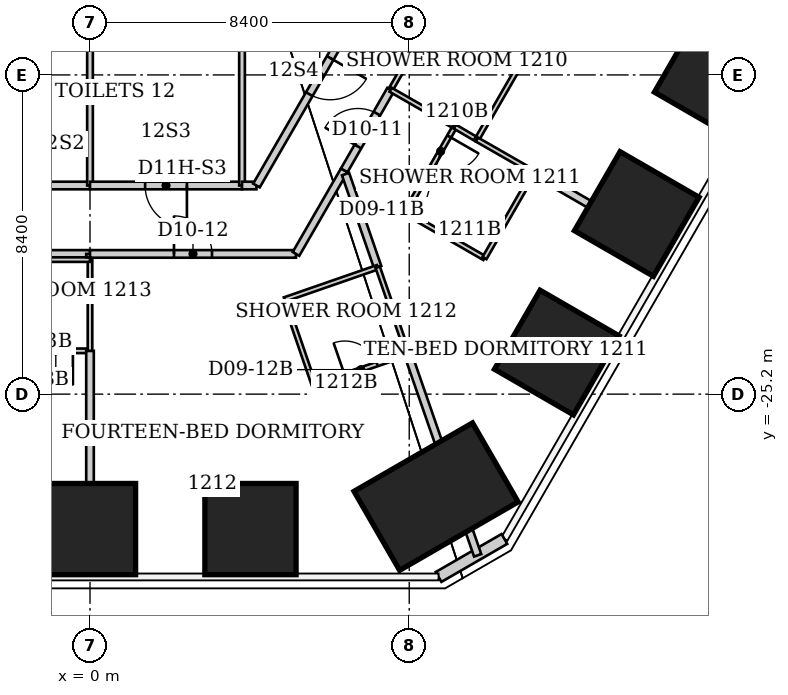
"""IFC4 building model, lengths in metres.
Left out: names, types, materials, properties, quantities, classifications, styles, units other than length and angle.
Written with IfcOpenShell. Run it as: python <this file> out.ifc"""

import sys

from ifc_helpers import new_model, si_unit, direction, frame, frame_2d, origin, origin_2d, place, context, subcontext, project, spatial, rectangle, extrude, clip, halfspace, element, fill, save


model = new_model("IFC4")
c1 = context("Model", 3, precision=1e-05, world=origin(), true_north=direction((0.0, 1.0)))
c2 = subcontext(c1, "Body", "Model", "MODEL_VIEW")
j1 = project(units=[si_unit("LENGTHUNIT", "METRE"), si_unit("PLANEANGLEUNIT", "RADIAN")], contexts=[c1])
p1 = place(None, origin())
s1 = spatial("IfcSite", under=j1, at=p1, CompositionType="ELEMENT")
p2 = place(p1, origin())
s2 = spatial("IfcBuilding", under=s1, at=p2, CompositionType="ELEMENT")
p3 = place(p2, frame((0.0, 0.0, 53.4)))
s3 = spatial("IfcBuildingStorey", under=s2, at=p3, CompositionType="ELEMENT", Elevation=53.4)
p4 = place(p3, frame((16.491, -16.813, 0.0), z_axis=(0.0, 0.0, 1.0), x_axis=(0.866025403784, -0.5, 0.0)))
e1 = element("IfcColumn", 1, at=p4, inside=s3, PredefinedType="COLUMN", context=c2, shape_type="SweptSolid", body=[
    clip(extrude(rectangle(XDim=2.4, YDim=2.4, at=origin_2d()), origin(), (0.0, 0.0, 1.0), 3.744), halfspace(frame((0.0, 0.0, 3.64)), False)),
])
p5 = place(p3, frame((14.387, -20.459, 0.0), z_axis=(0.0, 0.0, 1.0), x_axis=(0.866025403784, -0.5, 0.0)))
e2 = element("IfcColumn", 2, at=p5, inside=s3, PredefinedType="COLUMN", context=c2, shape_type="SweptSolid", body=[
    clip(extrude(rectangle(XDim=2.4, YDim=2.4, at=origin_2d()), origin(), (0.0, 0.0, 1.0), 3.736), halfspace(frame((0.0, 0.0, 3.64)), False)),
])
p6 = place(p3, frame((12.282, -24.105, 0.0), z_axis=(0.0, 0.0, 1.0), x_axis=(0.866025403784, -0.5, 0.0)))
e3 = element("IfcColumn", 3, at=p6, inside=s3, PredefinedType="COLUMN", context=c2, shape_type="SweptSolid", body=[
    clip(extrude(rectangle(XDim=2.4, YDim=2.4, at=origin_2d()), origin(), (0.0, 0.0, 1.0), 3.728), halfspace(frame((0.0, 0.0, 3.64)), False)),
])
p7 = place(p3, frame((9.106, -27.897, 0.0), z_axis=(0.0, 0.0, 1.0), x_axis=(0.5, -0.866025403784, 0.0)))
e4 = element("IfcColumn", 4, at=p7, inside=s3, PredefinedType="COLUMN", context=c2, shape_type="SweptSolid", body=[
    clip(extrude(rectangle(XDim=2.4, YDim=3.6, at=origin_2d()), origin(), (0.0, 0.0, 1.0), 3.726), halfspace(frame((0.0, 0.0, 3.64)), False)),
])
p8 = place(p3, frame((4.222, -28.751, 0.0), z_axis=(0.0, 0.0, 1.0), x_axis=(0.0, -1.0, 0.0)))
e5 = element("IfcColumn", 5, at=p8, inside=s3, PredefinedType="COLUMN", context=c2, shape_type="SweptSolid", body=[
    clip(extrude(rectangle(XDim=2.4, YDim=2.4, at=origin_2d()), origin(), (0.0, 0.0, 1.0), 3.737), halfspace(frame((0.0, 0.0, 3.64)), False)),
])
p9 = place(p3, frame((0.0, -28.751, 0.0), z_axis=(0.0, 0.0, 1.0), x_axis=(0.0, -1.0, 0.0)))
e6 = element("IfcColumn", 6, at=p9, inside=s3, PredefinedType="COLUMN", context=c2, shape_type="SweptSolid", body=[
    clip(extrude(rectangle(XDim=2.4, YDim=2.4, at=origin_2d()), origin(), (0.0, 0.0, 1.0), 3.745), halfspace(frame((0.0, 0.0, 3.64)), False)),
])
p10 = place(p3, frame((10.904, -29.011, 0.0), z_axis=(0.0, 0.0, 1.0), x_axis=(-0.866010750942, -0.50002537861, 0.0)))
e7 = element("IfcWall", 7, at=p10, inside=s3, PredefinedType="SOLIDWALL", context=c2, shape_type="SweptSolid", body=[
    extrude(rectangle(XDim=2.0, YDim=0.3, at=frame_2d((1.0, 0.0))), origin(), (0.0, 0.0, 1.0), 3.64),
])
p11 = place(p3, frame((-5.42, -21.51, 0.0), z_axis=(0.0, 0.0, 1.0), x_axis=(1.0, 0.0, 0.0)))
e8 = element("IfcWall", 8, at=p11, inside=s3, PredefinedType="PARTITIONING", context=c2, shape_type="SweptSolid", body=[
    extrude(rectangle(XDim=5.42, YDim=0.2, at=frame_2d((2.71, 0.0))), origin(), (0.0, 0.0, 1.0), 3.64),
])
p12 = place(p11, frame((1.71, 0.0, 0.0)))
e9 = element("IfcOpeningElement", 9, at=p12, cuts=e8, PredefinedType="OPENING", context=c2, shape_type="SweptSolid", body=[
    extrude(rectangle(XDim=1.0, YDim=2.13, at=frame_2d((0.5, 1.065))), frame((0.0, 0.1, 0.0), z_axis=(0.0, -1.0, 0.0), x_axis=(1.0, 0.0, 0.0)), (0.0, 0.0, 1.0), 0.2),
])
p13 = place(p3, frame((-2.6, -24.06, 0.0), z_axis=(0.0, 0.0, 1.0), x_axis=(1.0, 0.0, 0.0)))
e10 = element("IfcWall", 10, at=p13, inside=s3, PredefinedType="PARTITIONING", context=c2, shape_type="SweptSolid", body=[
    extrude(rectangle(XDim=2.6, YDim=0.12, at=frame_2d((1.3, 0.0))), origin(), (0.0, 0.0, 1.0), 3.64),
])
p14 = place(p13, frame((1.25, 0.0, 0.0)))
e11 = element("IfcOpeningElement", 11, at=p14, cuts=e10, PredefinedType="OPENING", context=c2, shape_type="SweptSolid", body=[
    extrude(rectangle(XDim=0.9, YDim=2.03, at=frame_2d((0.45, 1.015))), frame((0.0, 0.06, 0.0), z_axis=(0.0, -1.0, 0.0), x_axis=(1.0, 0.0, 0.0)), (0.0, 0.0, 1.0), 0.12),
])
p15 = place(p3, frame((0.0, -29.89, 0.0), z_axis=(0.0, 0.0, 1.0), x_axis=(0.0, 1.0, 0.0)))
e12 = element("IfcWall", 12, at=p15, inside=s3, PredefinedType="PARTITIONING", context=c2, shape_type="SweptSolid", body=[
    extrude(rectangle(XDim=5.83, YDim=0.2, at=frame_2d((2.915, 0.0))), origin(), (0.0, 0.0, 1.0), 2.86),
])
p16 = place(p3, frame((0.0, -24.06, 0.0), z_axis=(0.0, 0.0, 1.0), x_axis=(0.0, 1.0, 0.0)))
e13 = element("IfcWall", 13, at=p16, inside=s3, PredefinedType="PARTITIONING", context=c2, shape_type="SweptSolid", body=[
    extrude(rectangle(XDim=2.4, YDim=0.12, at=frame_2d((1.2, 0.0))), origin(), (0.0, 0.0, 1.0), 2.86),
])
p17 = place(p3, frame((0.0, -21.66, 0.0), z_axis=(0.0, 0.0, 1.0), x_axis=(-1.0, 0.0, 0.0)))
e14 = element("IfcWall", 14, at=p17, inside=s3, PredefinedType="PARTITIONING", context=c2, shape_type="SweptSolid", body=[
    extrude(rectangle(XDim=2.6, YDim=0.12, at=frame_2d((1.3, 0.0))), origin(), (0.0, 0.0, 1.0), 3.64),
])
p18 = place(p3, frame((0.0, -21.6, 0.0), z_axis=(0.0, 0.0, 1.0), x_axis=(0.0, 1.0, 0.0)))
e15 = element("IfcWall", 15, at=p18, inside=s3, PredefinedType="PARTITIONING", context=c2, shape_type="SweptSolid", body=[
    extrude(rectangle(XDim=0.09, YDim=0.2, at=frame_2d((0.045, 0.0))), origin(), (0.0, 0.0, 1.0), 3.64),
])
p19 = place(p3, frame((0.0, -21.51, 0.0), z_axis=(0.0, 0.0, 1.0), x_axis=(1.0, 0.0, 0.0)))
e16 = element("IfcWall", 16, at=p19, inside=s3, PredefinedType="PARTITIONING", context=c2, shape_type="SweptSolid", body=[
    extrude(rectangle(XDim=5.42, YDim=0.2, at=frame_2d((2.71, 0.0))), origin(), (0.0, 0.0, 1.0), 3.64),
])
p20 = place(p19, frame((2.21, 0.0, 0.0)))
e17 = element("IfcOpeningElement", 17, at=p20, cuts=e16, PredefinedType="OPENING", context=c2, shape_type="SweptSolid", body=[
    extrude(rectangle(XDim=1.0, YDim=2.13, at=frame_2d((0.5, 1.065))), frame((0.0, 0.1, 0.0), z_axis=(0.0, -1.0, 0.0), x_axis=(1.0, 0.0, 0.0)), (0.0, 0.0, 1.0), 0.2),
])
p21 = place(p3, frame((0.0, -19.71, 0.0), z_axis=(0.0, 0.0, 1.0), x_axis=(-1.0, 0.0, 0.0)))
e18 = element("IfcWall", 18, at=p21, inside=s3, PredefinedType="PARTITIONING", context=c2, shape_type="SweptSolid", body=[
    extrude(rectangle(XDim=4.0, YDim=0.2, at=frame_2d((2.0, 0.0))), origin(), (0.0, 0.0, 1.0), 3.64),
])
p22 = place(p3, frame((0.0, -13.95, 0.0), z_axis=(0.0, 0.0, 1.0), x_axis=(0.0, -1.0, 0.0)))
e19 = element("IfcWall", 19, at=p22, inside=s3, PredefinedType="PARTITIONING", context=c2, shape_type="SweptSolid", body=[
    extrude(rectangle(XDim=5.76, YDim=0.15, at=frame_2d((2.88, 0.0))), origin(), (0.0, 0.0, 1.0), 2.86),
])
p23 = place(p3, frame((4.0, -19.71, 0.0), z_axis=(0.0, 0.0, 1.0), x_axis=(-1.0, 0.0, 0.0)))
e20 = element("IfcWall", 20, at=p23, inside=s3, PredefinedType="PARTITIONING", context=c2, shape_type="SweptSolid", body=[
    extrude(rectangle(XDim=4.0, YDim=0.2, at=frame_2d((2.0, 0.0))), origin(), (0.0, 0.0, 1.0), 3.64),
])
p24 = place(p23, frame((1.45, 0.0, 0.0)))
e21 = element("IfcOpeningElement", 21, at=p24, cuts=e20, PredefinedType="OPENING", context=c2, shape_type="SweptSolid", body=[
    extrude(rectangle(XDim=1.1, YDim=2.2, at=frame_2d((0.55, 1.1))), frame((0.0, 0.1, 0.0), z_axis=(0.0, -1.0, 0.0), x_axis=(1.0, 0.0, 0.0)), (0.0, 0.0, 1.0), 0.2),
])
p25 = place(p3, frame((4.0, -13.95, 0.0), z_axis=(0.0, 0.0, 1.0), x_axis=(0.0, -1.0, 0.0)))
e22 = element("IfcWall", 22, at=p25, inside=s3, PredefinedType="PARTITIONING", context=c2, shape_type="SweptSolid", body=[
    extrude(rectangle(XDim=5.76, YDim=0.15, at=frame_2d((2.88, 0.0))), origin(), (0.0, 0.0, 1.0), 3.64),
])
p26 = place(p3, frame((4.38, -19.71, 0.0), z_axis=(0.0, 0.0, 1.0), x_axis=(-1.0, 0.0, 0.0)))
e23 = element("IfcWall", 23, at=p26, inside=s3, PredefinedType="PARTITIONING", context=c2, shape_type="SweptSolid", body=[
    extrude(rectangle(XDim=0.38, YDim=0.2, at=frame_2d((0.19, 0.0))), origin(), (0.0, 0.0, 1.0), 3.64),
])
p27 = place(p3, frame((5.12, -22.71, 0.0), z_axis=(0.0, 0.0, 1.0), x_axis=(0.324880771143, -0.945754981241, 0.0)))
e24 = element("IfcWall", 24, at=p27, inside=s3, PredefinedType="PARTITIONING", context=c2, shape_type="SweptSolid", body=[
    extrude(rectangle(XDim=2.4, YDim=0.12, at=frame_2d((1.2, 0.0))), origin(), (0.0, 0.0, 1.0), 3.64),
])
p28 = place(p3, frame((5.42, -21.51, 0.0), z_axis=(0.0, 0.0, 1.0), x_axis=(0.499963722229, 0.866046347752, 0.0)))
e25 = element("IfcWall", 25, at=p28, inside=s3, PredefinedType="PARTITIONING", context=c2, shape_type="SweptSolid", body=[
    extrude(rectangle(XDim=2.54, YDim=0.2, at=frame_2d((1.27, 0.0))), origin(), (0.0, 0.0, 1.0), 3.64),
])
p29 = place(p3, frame((5.9, -24.98, 0.0), z_axis=(0.0, 0.0, 1.0), x_axis=(0.945165466094, 0.326591857987, 0.0)))
e26 = element("IfcWall", 26, at=p29, inside=s3, PredefinedType="PARTITIONING", context=c2, shape_type="SweptSolid", body=[
    extrude(rectangle(XDim=2.603, YDim=0.12, at=frame_2d((1.302, 0.0))), origin(), (0.0, 0.0, 1.0), 3.64),
])
p30 = place(p29, frame((0.85, 0.0, 0.0)))
e27 = element("IfcOpeningElement", 27, at=p30, cuts=e26, PredefinedType="OPENING", context=c2, shape_type="SweptSolid", body=[
    extrude(rectangle(XDim=0.9, YDim=2.03, at=frame_2d((0.45, 1.015))), frame((0.0, 0.06, 0.0), z_axis=(0.0, -1.0, 0.0), x_axis=(1.0, 0.0, 0.0)), (0.0, 0.0, 1.0), 0.12),
])
p31 = place(p3, frame((6.69, -19.31, 0.0), z_axis=(0.0, 0.0, 1.0), x_axis=(0.498748634132, 0.866746675766, 0.0)))
e28 = element("IfcWall", 28, at=p31, inside=s3, PredefinedType="PARTITIONING", context=c2, shape_type="SweptSolid", body=[
    extrude(rectangle(XDim=2.446, YDim=0.2, at=frame_2d((1.223, 0.0))), origin(), (0.0, 0.0, 1.0), 3.64),
])
p32 = place(p31, frame((0.723, 0.0, 0.0)))
e29 = element("IfcOpeningElement", 29, at=p32, cuts=e28, PredefinedType="OPENING", context=c2, shape_type="SweptSolid", body=[
    extrude(rectangle(XDim=1.0, YDim=2.13, at=frame_2d((0.5, 1.065))), frame((0.0, 0.1, 0.0), z_axis=(0.0, -1.0, 0.0), x_axis=(1.0, 0.0, 0.0)), (0.0, 0.0, 1.0), 0.2),
])
p33 = place(p3, frame((6.724, -19.409, 0.0), z_axis=(0.0, 0.0, 1.0), x_axis=(0.326182205696, -0.945306917719, 0.0)))
e30 = element("IfcWall", 30, at=p33, inside=s3, PredefinedType="PARTITIONING", context=c2, shape_type="SweptSolid", body=[
    extrude(rectangle(XDim=2.593, YDim=0.2, at=frame_2d((1.296, 0.0))), origin(), (0.0, 0.0, 1.0), 3.64),
])
p34 = place(p3, frame((7.57, -21.86, 0.0), z_axis=(0.0, 0.0, 1.0), x_axis=(-0.944782191137, -0.327698964463, 0.0)))
e31 = element("IfcWall", 31, at=p34, inside=s3, PredefinedType="PARTITIONING", context=c2, shape_type="SweptSolid", body=[
    extrude(rectangle(XDim=2.594, YDim=0.12, at=frame_2d((1.297, 0.0))), origin(), (0.0, 0.0, 1.0), 3.64),
])
p35 = place(p3, frame((7.57, -21.86, 0.0), z_axis=(0.0, 0.0, 1.0), x_axis=(0.327706459026, -0.944779591605, 0.0)))
e32 = element("IfcWall", 32, at=p35, inside=s3, PredefinedType="PARTITIONING", context=c2, shape_type="SweptSolid", body=[
    extrude(rectangle(XDim=2.35, YDim=0.12, at=frame_2d((1.175, 0.0))), origin(), (0.0, 0.0, 1.0), 3.64),
])
p36 = place(p3, frame((7.71, -13.95, 0.0), z_axis=(0.0, 0.0, 1.0), x_axis=(-0.500511113963, -0.865730110831, 0.0)))
e33 = element("IfcWall", 33, at=p36, inside=s3, PredefinedType="PARTITIONING", context=c2, shape_type="SweptSolid", body=[
    extrude(rectangle(XDim=6.653, YDim=0.2, at=frame_2d((3.327, 0.0))), origin(), (0.0, 0.0, 1.0), 3.64),
])
p37 = place(p36, frame((2.777, 0.0, 0.0)))
e34 = element("IfcOpeningElement", 34, at=p37, cuts=e33, PredefinedType="OPENING", context=c2, shape_type="SweptSolid", body=[
    extrude(rectangle(XDim=1.1, YDim=2.2, at=frame_2d((0.55, 1.1))), frame((0.0, 0.1, 0.0), z_axis=(0.0, -1.0, 0.0), x_axis=(1.0, 0.0, 0.0)), (0.0, 0.0, 1.0), 0.2),
])
p38 = place(p3, frame((7.91, -17.19, 0.0), z_axis=(0.0, 0.0, 1.0), x_axis=(0.499737123639, 0.866177122335, 0.0)))
e35 = element("IfcWall", 35, at=p38, inside=s3, PredefinedType="PARTITIONING", context=c2, shape_type="SweptSolid", body=[
    extrude(rectangle(XDim=2.401, YDim=0.12, at=frame_2d((1.201, 0.0))), origin(), (0.0, 0.0, 1.0), 3.64),
])
p39 = place(p3, frame((7.91, -17.19, 0.0), z_axis=(0.0, 0.0, 1.0), x_axis=(0.8673242112, -0.497743621421, 0.0)))
e36 = element("IfcWall", 36, at=p39, inside=s3, PredefinedType="PARTITIONING", context=c2, shape_type="SweptSolid", body=[
    extrude(rectangle(XDim=1.949, YDim=0.12, at=frame_2d((0.974, 0.0))), origin(), (0.0, 0.0, 1.0), 3.64),
])
p40 = place(p3, frame((8.3, -20.42, 0.0), z_axis=(0.0, 0.0, 1.0), x_axis=(0.866177122335, -0.499737123639, 0.0)))
e37 = element("IfcWall", 37, at=p40, inside=s3, PredefinedType="PARTITIONING", context=c2, shape_type="SweptSolid", body=[
    extrude(rectangle(XDim=2.401, YDim=0.12, at=frame_2d((1.201, 0.0))), origin(), (0.0, 0.0, 1.0), 3.64),
])
p41 = place(p3, frame((8.36, -24.13, 0.0), z_axis=(0.0, 0.0, 1.0), x_axis=(0.327332811485, -0.944909112309, 0.0)))
e38 = element("IfcWall", 38, at=p41, inside=s3, PredefinedType="PARTITIONING", context=c2, shape_type="SweptSolid", body=[
    extrude(rectangle(XDim=5.621, YDim=0.2, at=frame_2d((2.811, 0.0))), origin(), (0.0, 0.0, 1.0), 3.64),
])
p42 = place(p3, frame((9.6, -18.16, 0.0), z_axis=(0.0, 0.0, 1.0), x_axis=(-0.498627694264, -0.866816256489, 0.0)))
e39 = element("IfcWall", 39, at=p42, inside=s3, PredefinedType="PARTITIONING", context=c2, shape_type="SweptSolid", body=[
    extrude(rectangle(XDim=2.607, YDim=0.12, at=frame_2d((1.304, 0.0))), origin(), (0.0, 0.0, 1.0), 3.64),
])
p43 = place(p42, frame((0.3, 0.0, 0.0)))
e40 = element("IfcOpeningElement", 40, at=p43, cuts=e39, PredefinedType="OPENING", context=c2, shape_type="SweptSolid", body=[
    extrude(rectangle(XDim=0.9, YDim=2.03, at=frame_2d((0.45, 1.015))), frame((0.0, 0.06, 0.0), z_axis=(0.0, -1.0, 0.0), x_axis=(1.0, 0.0, 0.0)), (0.0, 0.0, 1.0), 0.12),
])
p44 = place(p3, frame((9.6, -18.16, 0.0), z_axis=(0.0, 0.0, 1.0), x_axis=(0.862577739272, -0.505924543497, 0.0)))
e41 = element("IfcWall", 41, at=p44, inside=s3, PredefinedType="PARTITIONING", context=c2, shape_type="SweptSolid", body=[
    extrude(rectangle(XDim=0.672, YDim=0.12, at=frame_2d((0.336, 0.0))), origin(), (0.0, 0.0, 1.0), 3.64),
])
p45 = place(p3, frame((10.18, -18.5, 0.0), z_axis=(0.0, 0.0, 1.0), x_axis=(0.499693115345, 0.866202511239, 0.0)))
e42 = element("IfcWall", 42, at=p45, inside=s3, PredefinedType="PARTITIONING", context=c2, shape_type="SweptSolid", body=[
    extrude(rectangle(XDim=2.401, YDim=0.12, at=frame_2d((1.201, 0.0))), origin(), (0.0, 0.0, 1.0), 3.64),
])
p46 = place(p3, frame((10.18, -18.5, 0.0), z_axis=(0.0, 0.0, 1.0), x_axis=(0.867564547129, -0.497324598794, 0.0)))
e43 = element("IfcWall", 43, at=p46, inside=s3, PredefinedType="PARTITIONING", context=c2, shape_type="SweptSolid", body=[
    extrude(rectangle(XDim=1.729, YDim=0.12, at=frame_2d((0.865, 0.0))), origin(), (0.0, 0.0, 1.0), 3.64),
])
p47 = place(p3, frame((10.38, -21.62, 0.0), z_axis=(0.0, 0.0, 1.0), x_axis=(0.498627694264, 0.866816256489, 0.0)))
e44 = element("IfcWall", 44, at=p47, inside=s3, PredefinedType="PARTITIONING", context=c2, shape_type="SweptSolid", body=[
    extrude(rectangle(XDim=2.607, YDim=0.12, at=frame_2d((1.304, 0.0))), origin(), (0.0, 0.0, 1.0), 3.64),
])
p48 = place(p3, frame((11.38, -16.42, 0.0), z_axis=(0.0, 0.0, 1.0), x_axis=(-0.866154567199, 0.49977621564, 0.0)))
e45 = element("IfcWall", 45, at=p48, inside=s3, PredefinedType="PARTITIONING", context=c2, shape_type="SweptSolid", body=[
    extrude(rectangle(XDim=2.621, YDim=0.12, at=frame_2d((1.311, 0.0))), origin(), (0.0, 0.0, 1.0), 2.878),
])
p49 = place(p48, frame((1.421, 0.0, 0.0)))
e46 = element("IfcOpeningElement", 46, at=p49, cuts=e45, PredefinedType="OPENING", context=c2, shape_type="SweptSolid", body=[
    extrude(rectangle(XDim=0.9, YDim=2.03, at=frame_2d((0.45, 1.015))), frame((0.0, 0.06, 0.0), z_axis=(0.0, -1.0, 0.0), x_axis=(1.0, 0.0, 0.0)), (0.0, 0.0, 1.0), 0.12),
])
p50 = place(p3, frame((11.68, -19.36, 0.0), z_axis=(0.0, 0.0, 1.0), x_axis=(0.865885444553, -0.500242338183, 0.0)))
e47 = element("IfcWall", 47, at=p50, inside=s3, PredefinedType="PARTITIONING", context=c2, shape_type="SweptSolid", body=[
    extrude(rectangle(XDim=4.038, YDim=0.2, at=frame_2d((2.019, 0.0))), origin(), (0.0, 0.0, 1.0), 3.64),
])
p51 = place(p32, origin())
e48 = element("IfcDoor", 48, at=p51, inside=s3, OperationType="SINGLE_SWING_LEFT", PredefinedType="DOOR", context=c2, shape_type="SweptSolid", body=[
    extrude(rectangle(XDim=1.0, YDim=2.13, at=frame_2d((0.5, 1.065))), frame((0.0, 0.025, 0.0), z_axis=(0.0, -1.0, 0.0), x_axis=(1.0, 0.0, 0.0)), (0.0, 0.0, 1.0), 0.05),
])
fill(e29, e48)
p52 = place(p43, origin())
e49 = element("IfcDoor", 49, at=p52, inside=s3, OperationType="SINGLE_SWING_LEFT", PredefinedType="DOOR", context=c2, shape_type="SweptSolid", body=[
    extrude(rectangle(XDim=0.9, YDim=2.03, at=frame_2d((0.45, 1.015))), frame((0.0, 0.025, 0.0), z_axis=(0.0, -1.0, 0.0), x_axis=(1.0, 0.0, 0.0)), (0.0, 0.0, 1.0), 0.05),
])
fill(e40, e49)
p53 = place(p20, origin())
e50 = element("IfcDoor", 50, at=p53, inside=s3, OperationType="SINGLE_SWING_LEFT", PredefinedType="DOOR", context=c2, shape_type="SweptSolid", body=[
    extrude(rectangle(XDim=1.0, YDim=2.13, at=frame_2d((0.5, 1.065))), frame((0.0, 0.025, 0.0), z_axis=(0.0, -1.0, 0.0), x_axis=(1.0, 0.0, 0.0)), (0.0, 0.0, 1.0), 0.05),
])
fill(e17, e50)
p54 = place(p30, origin())
e51 = element("IfcDoor", 51, at=p54, inside=s3, OperationType="SINGLE_SWING_LEFT", PredefinedType="DOOR", context=c2, shape_type="SweptSolid", body=[
    extrude(rectangle(XDim=0.9, YDim=2.03, at=frame_2d((0.45, 1.015))), frame((0.0, 0.025, 0.0), z_axis=(0.0, -1.0, 0.0), x_axis=(1.0, 0.0, 0.0)), (0.0, 0.0, 1.0), 0.05),
])
fill(e27, e51)
p55 = place(p14, origin())
e52 = element("IfcDoor", 52, at=p55, inside=s3, OperationType="SINGLE_SWING_RIGHT", PredefinedType="DOOR", context=c2, shape_type="SweptSolid", body=[
    extrude(rectangle(XDim=0.9, YDim=2.03, at=frame_2d((0.45, 1.015))), frame((0.0, 0.025, 0.0), z_axis=(0.0, -1.0, 0.0), x_axis=(1.0, 0.0, 0.0)), (0.0, 0.0, 1.0), 0.05),
])
fill(e11, e52)
p56 = place(p24, origin())
e53 = element("IfcDoor", 53, at=p56, inside=s3, OperationType="SINGLE_SWING_LEFT", PredefinedType="DOOR", context=c2, shape_type="SweptSolid", body=[
    extrude(rectangle(XDim=1.1, YDim=2.2, at=frame_2d((0.55, 1.1))), frame((0.0, 0.025, 0.0), z_axis=(0.0, -1.0, 0.0), x_axis=(1.0, 0.0, 0.0)), (0.0, 0.0, 1.0), 0.05),
])
fill(e21, e53)
p57 = place(p37, origin())
e54 = element("IfcDoor", 54, at=p57, inside=s3, OperationType="SINGLE_SWING_LEFT", PredefinedType="DOOR", context=c2, shape_type="SweptSolid", body=[
    extrude(rectangle(XDim=1.1, YDim=2.2, at=frame_2d((0.55, 1.1))), frame((0.0, 0.025, 0.0), z_axis=(0.0, -1.0, 0.0), x_axis=(1.0, 0.0, 0.0)), (0.0, 0.0, 1.0), 0.05),
])
fill(e34, e54)
save(model, sys.argv[1])
